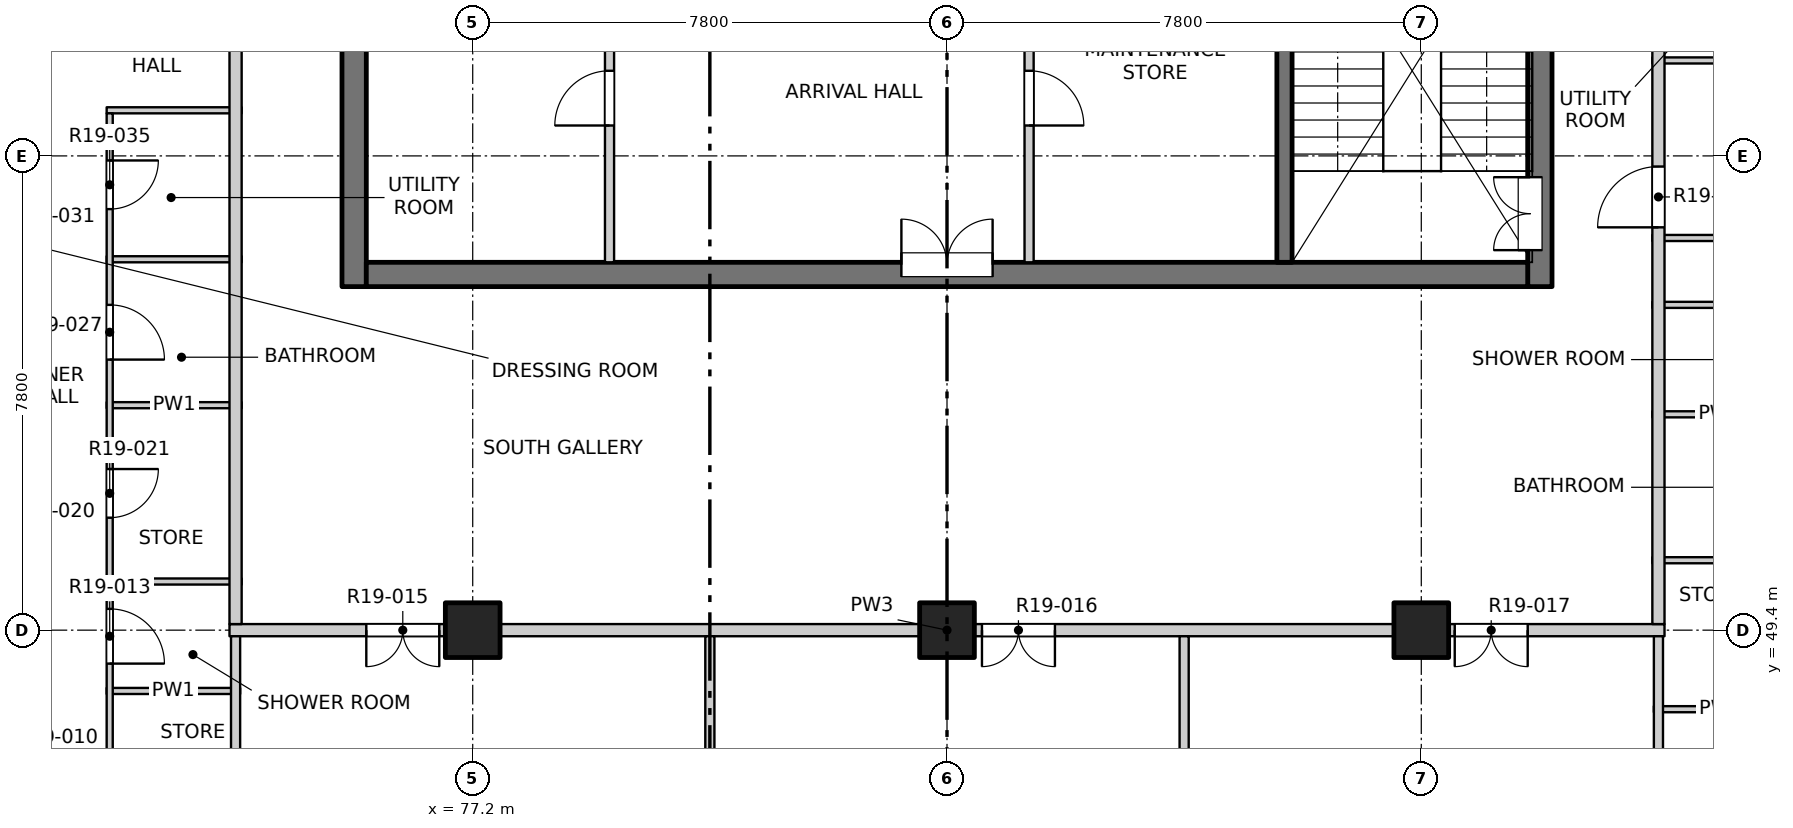
"""IFC4 building model, lengths in metres.
Left out: names, types, materials, properties, quantities, classifications, styles, units other than length and angle.
Written with IfcOpenShell. Run it as: python <this file> out.ifc"""

import sys

from ifc_helpers import new_model, si_unit, direction, frame, frame_2d, origin, origin_2d, place, context, subcontext, project, spatial, rectangle, extrude, element, fill, save


model = new_model("IFC4")
c1 = context("Model", 3, precision=1e-05, world=origin(), true_north=direction((0.0, 1.0)))
c2 = subcontext(c1, "Body", "Model", "MODEL_VIEW")
j1 = project(units=[si_unit("LENGTHUNIT", "METRE"), si_unit("PLANEANGLEUNIT", "RADIAN")], contexts=[c1])
p1 = place(None, origin())
s1 = spatial("IfcSite", under=j1, at=p1, CompositionType="ELEMENT")
p2 = place(p1, origin())
s2 = spatial("IfcBuilding", under=s1, at=p2, CompositionType="ELEMENT")
p3 = place(p2, frame((0.0, 0.0, 197.3)))
s3 = spatial("IfcBuildingStorey", under=s2, at=p3, CompositionType="ELEMENT", Elevation=197.3)
for number, where, z_axis, x_axis in (
    (1, (77.2, 49.4, -0.3), (0.0, 0.0, 1.0), (1.0, 0.0, 0.0)),
    (2, (85.0, 49.4, -0.3), (0.0, 0.0, 1.0), (1.0, 0.0, 0.0)),
    (3, (92.8, 49.4, -0.3), (0.0, 0.0, 1.0), (1.0, 0.0, 0.0)),
):
    element("IfcColumn", number, at=place(p3, frame(where, z_axis=z_axis, x_axis=x_axis)), inside=s3, PredefinedType="COLUMN", context=c2, shape_type="SweptSolid", body=[
        extrude(rectangle(XDim=0.9, YDim=0.9, at=origin_2d()), origin(), (0.0, 0.0, 1.0), 3.45),
    ])
p4 = place(p3, frame((75.25, 55.05, -0.3), z_axis=(0.0, 0.0, 1.0), x_axis=(0.0, 1.0, 0.0)))
e4 = element("IfcWall", 4, at=p4, inside=s3, PredefinedType="SOLIDWALL", context=c2, shape_type="SweptSolid", body=[
    extrude(rectangle(XDim=22.25, YDim=0.4, at=frame_2d((11.125, 0.0))), origin(), (0.0, 0.0, 1.0), 3.45),
])
p5 = place(p4, frame((7.4, 0.0, 0.3)))
e5 = element("IfcOpeningElement", 5, at=p5, cuts=e4, PredefinedType="OPENING", context=c2, shape_type="SweptSolid", body=[
    extrude(rectangle(XDim=0.9, YDim=2.1, at=frame_2d((0.45, 1.05))), frame((0.0, 0.21, 0.0), z_axis=(0.0, -1.0, 0.0), x_axis=(1.0, 0.0, 0.0)), (0.0, 0.0, 1.0), 0.42),
])
p6 = place(p4, frame((13.7, 0.0, 0.3)))
e6 = element("IfcOpeningElement", 6, at=p6, cuts=e4, PredefinedType="OPENING", context=c2, shape_type="SweptSolid", body=[
    extrude(rectangle(XDim=0.9, YDim=2.1, at=frame_2d((0.45, 1.05))), frame((0.0, 0.21, 0.0), z_axis=(0.0, -1.0, 0.0), x_axis=(1.0, 0.0, 0.0)), (0.0, 0.0, 1.0), 0.42),
])
p7 = place(p4, frame((20.0, 0.0, 0.3)))
e7 = element("IfcOpeningElement", 7, at=p7, cuts=e4, PredefinedType="OPENING", context=c2, shape_type="SweptSolid", body=[
    extrude(rectangle(XDim=0.9, YDim=2.1, at=frame_2d((0.45, 1.05))), frame((0.0, 0.21, 0.0), z_axis=(0.0, -1.0, 0.0), x_axis=(1.0, 0.0, 0.0)), (0.0, 0.0, 1.0), 0.42),
])
p8 = place(p3, frame((94.75, 55.05, -0.3), z_axis=(0.0, 0.0, 1.0), x_axis=(0.0, 1.0, 0.0)))
e8 = element("IfcWall", 8, at=p8, inside=s3, PredefinedType="SOLIDWALL", context=c2, shape_type="SweptSolid", body=[
    extrude(rectangle(XDim=6.9, YDim=0.4, at=frame_2d((3.45, 0.0))), origin(), (0.0, 0.0, 1.0), 3.45),
])
p9 = place(p8, frame((0.6, 0.0, 0.3)))
e9 = element("IfcOpeningElement", 9, at=p9, cuts=e8, PredefinedType="OPENING", context=c2, shape_type="SweptSolid", body=[
    extrude(rectangle(XDim=1.2, YDim=2.1, at=frame_2d((0.6, 1.05))), frame((0.0, 0.21, 0.0), z_axis=(0.0, -1.0, 0.0), x_axis=(1.0, 0.0, 0.0)), (0.0, 0.0, 1.0), 0.42),
])
p10 = place(p3, frame((75.45, 55.25, -0.3), z_axis=(0.0, 0.0, 1.0), x_axis=(1.0, 0.0, 0.0)))
e10 = element("IfcWall", 10, at=p10, inside=s3, PredefinedType="SOLIDWALL", context=c2, shape_type="SweptSolid", body=[
    extrude(rectangle(XDim=19.1, YDim=0.4, at=frame_2d((9.55, 0.0))), origin(), (0.0, 0.0, 1.0), 3.45),
])
p11 = place(p10, frame((8.8, 0.0, 0.3)))
e11 = element("IfcOpeningElement", 11, at=p11, cuts=e10, PredefinedType="OPENING", context=c2, shape_type="SweptSolid", body=[
    extrude(rectangle(XDim=1.5, YDim=2.1, at=frame_2d((0.75, 1.05))), frame((0.0, 0.21, 0.0), z_axis=(0.0, -1.0, 0.0), x_axis=(1.0, 0.0, 0.0)), (0.0, 0.0, 1.0), 0.42),
])
p12 = place(p3, frame((90.55, 55.45, -0.3), z_axis=(0.0, 0.0, 1.0), x_axis=(0.0, 1.0, 0.0)))
e12 = element("IfcWall", 12, at=p12, inside=s3, PredefinedType="SOLIDWALL", context=c2, shape_type="SweptSolid", body=[
    extrude(rectangle(XDim=6.5, YDim=0.25, at=frame_2d((3.25, 0.0))), origin(), (0.0, 0.0, 1.0), 3.45),
])
p13 = place(p3, frame((96.625, 48.1, 0.0), z_axis=(0.0, 0.0, 1.0), x_axis=(1.0, 0.0, 0.0)))
e13 = element("IfcWall", 13, at=p13, inside=s3, PredefinedType="PARTITIONING", context=c2, shape_type="SweptSolid", body=[
    extrude(rectangle(XDim=2.195, YDim=0.1, at=frame_2d((1.098, 0.0))), origin(), (0.0, 0.0, 1.0), 3.15),
])
p14 = place(p3, frame((71.18, 48.4, 0.0), z_axis=(0.0, 0.0, 1.0), x_axis=(1.0, 0.0, 0.0)))
e14 = element("IfcWall", 14, at=p14, inside=s3, PredefinedType="PARTITIONING", context=c2, shape_type="SweptSolid", body=[
    extrude(rectangle(XDim=2.195, YDim=0.1, at=frame_2d((1.097, 0.0))), origin(), (0.0, 0.0, 1.0), 3.15),
])
p15 = place(p3, frame((73.2, 49.4, 0.0), z_axis=(0.0, 0.0, 1.0), x_axis=(1.0, 0.0, 0.0)))
e15 = element("IfcWall", 15, at=p15, inside=s3, PredefinedType="PARTITIONING", context=c2, shape_type="SweptSolid", body=[
    extrude(rectangle(XDim=23.6, YDim=0.2, at=frame_2d((11.8, 0.0))), origin(), (0.0, 0.0, 1.0), 3.15),
])
p16 = place(p15, frame((2.25, 0.0, 0.0)))
e16 = element("IfcOpeningElement", 16, at=p16, cuts=e15, PredefinedType="OPENING", context=c2, shape_type="SweptSolid", body=[
    extrude(rectangle(XDim=1.2, YDim=2.1, at=frame_2d((0.6, 1.05))), frame((0.0, 0.11, 0.0), z_axis=(0.0, -1.0, 0.0), x_axis=(1.0, 0.0, 0.0)), (0.0, 0.0, 1.0), 0.22),
])
p17 = place(p15, frame((12.375, 0.0, 0.0)))
e17 = element("IfcOpeningElement", 17, at=p17, cuts=e15, PredefinedType="OPENING", context=c2, shape_type="SweptSolid", body=[
    extrude(rectangle(XDim=1.2, YDim=2.1, at=frame_2d((0.6, 1.05))), frame((0.0, 0.11, 0.0), z_axis=(0.0, -1.0, 0.0), x_axis=(1.0, 0.0, 0.0)), (0.0, 0.0, 1.0), 0.22),
])
p18 = place(p15, frame((20.15, 0.0, 0.0)))
e18 = element("IfcOpeningElement", 18, at=p18, cuts=e15, PredefinedType="OPENING", context=c2, shape_type="SweptSolid", body=[
    extrude(rectangle(XDim=1.2, YDim=2.1, at=frame_2d((0.6, 1.05))), frame((0.0, 0.11, 0.0), z_axis=(0.0, -1.0, 0.0), x_axis=(1.0, 0.0, 0.0)), (0.0, 0.0, 1.0), 0.22),
])
for number, where, z_axis, x_axis in (
    (19, (71.18, 50.2, 0.0), (0.0, 0.0, 1.0), (1.0, 0.0, 0.0)),
    (20, (96.6, 50.55, 0.0), (0.0, 0.0, 1.0), (1.0, 0.0, 0.0)),
    (21, (96.6, 52.95, 0.0), (0.0, 0.0, 1.0), (1.0, 0.0, 0.0)),
    (22, (71.18, 53.1, 0.0), (0.0, 0.0, 1.0), (1.0, 0.0, 0.0)),
    (23, (96.6, 54.75, 0.0), (0.0, 0.0, 1.0), (1.0, 0.0, 0.0)),
    (24, (71.18, 55.5, 0.0), (0.0, 0.0, 1.0), (1.0, 0.0, 0.0)),
    (25, (96.6, 55.85, 0.0), (0.0, 0.0, 1.0), (1.0, 0.0, 0.0)),
    (26, (71.18, 57.95, 0.0), (0.0, 0.0, 1.0), (1.0, 0.0, 0.0)),
    (27, (96.6, 58.77, 0.0), (0.0, 0.0, 1.0), (1.0, 0.0, 0.0)),
):
    element("IfcWall", number, at=place(p3, frame(where, z_axis=z_axis, x_axis=x_axis)), inside=s3, PredefinedType="PARTITIONING", context=c2, shape_type="SweptSolid", body=[
        extrude(rectangle(XDim=2.22, YDim=0.1, at=frame_2d((1.11, 0.0))), origin(), (0.0, 0.0, 1.0), 3.15),
    ])
p19 = place(p3, frame((71.23, 45.55, 0.0), z_axis=(0.0, 0.0, 1.0), x_axis=(0.0, 1.0, 0.0)))
e28 = element("IfcWall", 28, at=p19, inside=s3, PredefinedType="PARTITIONING", context=c2, shape_type="SweptSolid", body=[
    extrude(rectangle(XDim=12.35, YDim=0.1, at=frame_2d((6.175, 0.0))), origin(), (0.0, 0.0, 1.0), 3.15),
])
p20 = place(p19, frame((1.0, 0.0, 0.0)))
e29 = element("IfcOpeningElement", 29, at=p20, cuts=e28, PredefinedType="OPENING", context=c2, shape_type="SweptSolid", body=[
    extrude(rectangle(XDim=0.8, YDim=2.1, at=frame_2d((0.4, 1.05))), frame((0.0, 0.06, 0.0), z_axis=(0.0, -1.0, 0.0), x_axis=(1.0, 0.0, 0.0)), (0.0, 0.0, 1.0), 0.12),
])
p21 = place(p19, frame((3.3, 0.0, 0.0)))
e30 = element("IfcOpeningElement", 30, at=p21, cuts=e28, PredefinedType="OPENING", context=c2, shape_type="SweptSolid", body=[
    extrude(rectangle(XDim=0.9, YDim=2.1, at=frame_2d((0.45, 1.05))), frame((0.0, 0.06, 0.0), z_axis=(0.0, -1.0, 0.0), x_axis=(1.0, 0.0, 0.0)), (0.0, 0.0, 1.0), 0.12),
])
p22 = place(p19, frame((5.7, 0.0, 0.0)))
e31 = element("IfcOpeningElement", 31, at=p22, cuts=e28, PredefinedType="OPENING", context=c2, shape_type="SweptSolid", body=[
    extrude(rectangle(XDim=0.8, YDim=2.1, at=frame_2d((0.4, 1.05))), frame((0.0, 0.06, 0.0), z_axis=(0.0, -1.0, 0.0), x_axis=(1.0, 0.0, 0.0)), (0.0, 0.0, 1.0), 0.12),
])
p23 = place(p19, frame((8.3, 0.0, 0.0)))
e32 = element("IfcOpeningElement", 32, at=p23, cuts=e28, PredefinedType="OPENING", context=c2, shape_type="SweptSolid", body=[
    extrude(rectangle(XDim=0.9, YDim=2.1, at=frame_2d((0.45, 1.05))), frame((0.0, 0.06, 0.0), z_axis=(0.0, -1.0, 0.0), x_axis=(1.0, 0.0, 0.0)), (0.0, 0.0, 1.0), 0.12),
])
p24 = place(p19, frame((10.775, 0.0, 0.0)))
e33 = element("IfcOpeningElement", 33, at=p24, cuts=e28, PredefinedType="OPENING", context=c2, shape_type="SweptSolid", body=[
    extrude(rectangle(XDim=0.8, YDim=2.1, at=frame_2d((0.4, 1.05))), frame((0.0, 0.06, 0.0), z_axis=(0.0, -1.0, 0.0), x_axis=(1.0, 0.0, 0.0)), (0.0, 0.0, 1.0), 0.12),
])
p25 = place(p3, frame((73.3, 41.9, 0.0), z_axis=(0.0, 0.0, 1.0), x_axis=(0.0, 1.0, 0.0)))
e34 = element("IfcWall", 34, at=p25, inside=s3, PredefinedType="PARTITIONING", context=c2, shape_type="SweptSolid", body=[
    extrude(rectangle(XDim=7.4, YDim=0.15, at=frame_2d((3.7, 0.0))), origin(), (0.0, 0.0, 1.0), 3.15),
])
p26 = place(p3, frame((73.3, 49.5, 0.0), z_axis=(0.0, 0.0, 1.0), x_axis=(0.0, 1.0, 0.0)))
e35 = element("IfcWall", 35, at=p26, inside=s3, PredefinedType="PARTITIONING", context=c2, shape_type="SweptSolid", body=[
    extrude(rectangle(XDim=34.9, YDim=0.2, at=frame_2d((17.45, 0.0))), origin(), (0.0, 0.0, 1.0), 3.15),
])
p27 = place(p26, frame((9.725, 0.0, 0.0)))
e36 = element("IfcOpeningElement", 36, at=p27, cuts=e35, PredefinedType="OPENING", context=c2, shape_type="SweptSolid", body=[
    extrude(rectangle(XDim=1.0, YDim=2.1, at=frame_2d((0.5, 1.05))), frame((0.0, 0.11, 0.0), z_axis=(0.0, -1.0, 0.0), x_axis=(1.0, 0.0, 0.0)), (0.0, 0.0, 1.0), 0.22),
])
p28 = place(p26, frame((17.925, 0.0, 0.0)))
e37 = element("IfcOpeningElement", 37, at=p28, cuts=e35, PredefinedType="OPENING", context=c2, shape_type="SweptSolid", body=[
    extrude(rectangle(XDim=1.0, YDim=2.1, at=frame_2d((0.5, 1.05))), frame((0.0, 0.11, 0.0), z_axis=(0.0, -1.0, 0.0), x_axis=(1.0, 0.0, 0.0)), (0.0, 0.0, 1.0), 0.22),
])
p29 = place(p26, frame((33.675, 0.0, 0.0)))
e38 = element("IfcOpeningElement", 38, at=p29, cuts=e35, PredefinedType="OPENING", context=c2, shape_type="SweptSolid", body=[
    extrude(rectangle(XDim=1.0, YDim=2.1, at=frame_2d((0.5, 1.05))), frame((0.0, 0.11, 0.0), z_axis=(0.0, -1.0, 0.0), x_axis=(1.0, 0.0, 0.0)), (0.0, 0.0, 1.0), 0.22),
])
p30 = place(p3, frame((79.45, 55.45, 0.0), z_axis=(0.0, 0.0, 1.0), x_axis=(0.0, 1.0, 0.0)))
e39 = element("IfcWall", 39, at=p30, inside=s3, PredefinedType="PARTITIONING", context=c2, shape_type="SweptSolid", body=[
    extrude(rectangle(XDim=5.45, YDim=0.15, at=frame_2d((2.725, 0.0))), origin(), (0.0, 0.0, 1.0), 3.15),
])
p31 = place(p30, frame((2.25, 0.0, 0.0)))
e40 = element("IfcOpeningElement", 40, at=p31, cuts=e39, PredefinedType="OPENING", context=c2, shape_type="SweptSolid", body=[
    extrude(rectangle(XDim=0.9, YDim=2.1, at=frame_2d((0.45, 1.05))), frame((0.0, 0.085, 0.0), z_axis=(0.0, -1.0, 0.0), x_axis=(1.0, 0.0, 0.0)), (0.0, 0.0, 1.0), 0.17),
])
p32 = place(p3, frame((81.1, 41.9, 0.0), z_axis=(0.0, 0.0, 1.0), x_axis=(0.0, 1.0, 0.0)))
e41 = element("IfcWall", 41, at=p32, inside=s3, PredefinedType="PARTITIONING", context=c2, shape_type="SweptSolid", body=[
    extrude(rectangle(XDim=7.4, YDim=0.15, at=frame_2d((3.7, 0.0))), origin(), (0.0, 0.0, 1.0), 2.55),
])
p33 = place(p3, frame((86.35, 55.45, 0.0), z_axis=(0.0, 0.0, 1.0), x_axis=(0.0, 1.0, 0.0)))
e42 = element("IfcWall", 42, at=p33, inside=s3, PredefinedType="PARTITIONING", context=c2, shape_type="SweptSolid", body=[
    extrude(rectangle(XDim=5.575, YDim=0.15, at=frame_2d((2.788, 0.0))), origin(), (0.0, 0.0, 1.0), 3.15),
])
p34 = place(p33, frame((2.25, 0.0, 0.0)))
e43 = element("IfcOpeningElement", 43, at=p34, cuts=e42, PredefinedType="OPENING", context=c2, shape_type="SweptSolid", body=[
    extrude(rectangle(XDim=0.9, YDim=2.1, at=frame_2d((0.45, 1.05))), frame((0.0, 0.085, 0.0), z_axis=(0.0, -1.0, 0.0), x_axis=(1.0, 0.0, 0.0)), (0.0, 0.0, 1.0), 0.17),
])
p35 = place(p3, frame((88.9, 41.9, 0.0), z_axis=(0.0, 0.0, 1.0), x_axis=(0.0, 1.0, 0.0)))
e44 = element("IfcWall", 44, at=p35, inside=s3, PredefinedType="PARTITIONING", context=c2, shape_type="SweptSolid", body=[
    extrude(rectangle(XDim=7.4, YDim=0.15, at=frame_2d((3.7, 0.0))), origin(), (0.0, 0.0, 1.0), 2.55),
])
p36 = place(p3, frame((96.7, 41.9, 0.0), z_axis=(0.0, 0.0, 1.0), x_axis=(0.0, 1.0, 0.0)))
e45 = element("IfcWall", 45, at=p36, inside=s3, PredefinedType="PARTITIONING", context=c2, shape_type="SweptSolid", body=[
    extrude(rectangle(XDim=7.4, YDim=0.15, at=frame_2d((3.7, 0.0))), origin(), (0.0, 0.0, 1.0), 3.15),
])
p37 = place(p3, frame((96.7, 49.5, 0.0), z_axis=(0.0, 0.0, 1.0), x_axis=(0.0, 1.0, 0.0)))
e46 = element("IfcWall", 46, at=p37, inside=s3, PredefinedType="PARTITIONING", context=c2, shape_type="SweptSolid", body=[
    extrude(rectangle(XDim=34.9, YDim=0.2, at=frame_2d((17.45, 0.0))), origin(), (0.0, 0.0, 1.0), 3.15),
])
p38 = place(p37, frame((6.525, 0.0, 0.0)))
e47 = element("IfcOpeningElement", 47, at=p38, cuts=e46, PredefinedType="OPENING", context=c2, shape_type="SweptSolid", body=[
    extrude(rectangle(XDim=1.0, YDim=2.1, at=frame_2d((0.5, 1.05))), frame((0.0, 0.11, 0.0), z_axis=(0.0, -1.0, 0.0), x_axis=(1.0, 0.0, 0.0)), (0.0, 0.0, 1.0), 0.22),
])
p39 = place(p37, frame((14.275, 0.0, 0.0)))
e48 = element("IfcOpeningElement", 48, at=p39, cuts=e46, PredefinedType="OPENING", context=c2, shape_type="SweptSolid", body=[
    extrude(rectangle(XDim=1.0, YDim=2.1, at=frame_2d((0.5, 1.05))), frame((0.0, 0.11, 0.0), z_axis=(0.0, -1.0, 0.0), x_axis=(1.0, 0.0, 0.0)), (0.0, 0.0, 1.0), 0.22),
])
p40 = place(p37, frame((25.075, 0.0, 0.0)))
e49 = element("IfcOpeningElement", 49, at=p40, cuts=e46, PredefinedType="OPENING", context=c2, shape_type="SweptSolid", body=[
    extrude(rectangle(XDim=1.0, YDim=2.1, at=frame_2d((0.5, 1.05))), frame((0.0, 0.11, 0.0), z_axis=(0.0, -1.0, 0.0), x_axis=(1.0, 0.0, 0.0)), (0.0, 0.0, 1.0), 0.22),
])
p41 = place(p37, frame((30.475, 0.0, 0.0)))
e50 = element("IfcOpeningElement", 50, at=p41, cuts=e46, PredefinedType="OPENING", context=c2, shape_type="SweptSolid", body=[
    extrude(rectangle(XDim=1.0, YDim=2.1, at=frame_2d((0.5, 1.05))), frame((0.0, 0.11, 0.0), z_axis=(0.0, -1.0, 0.0), x_axis=(1.0, 0.0, 0.0)), (0.0, 0.0, 1.0), 0.22),
])
p42 = place(p21, origin())
e51 = element("IfcDoor", 51, at=p42, inside=s3, OperationType="SINGLE_SWING_RIGHT", PredefinedType="DOOR", context=c2, shape_type="SweptSolid", body=[
    extrude(rectangle(XDim=0.9, YDim=2.1, at=frame_2d((0.45, 1.05))), frame((0.0, 0.025, 0.0), z_axis=(0.0, -1.0, 0.0), x_axis=(1.0, 0.0, 0.0)), (0.0, 0.0, 1.0), 0.05),
])
fill(e30, e51)
p43 = place(p16, origin())
e52 = element("IfcDoor", 52, at=p43, inside=s3, OperationType="DOUBLE_DOOR_SINGLE_SWING", PredefinedType="DOOR", context=c2, shape_type="SweptSolid", body=[
    extrude(rectangle(XDim=1.2, YDim=2.1, at=frame_2d((0.6, 1.05))), frame((0.0, 0.025, 0.0), z_axis=(0.0, -1.0, 0.0), x_axis=(1.0, 0.0, 0.0)), (0.0, 0.0, 1.0), 0.05),
])
fill(e16, e52)
p44 = place(p17, origin())
e53 = element("IfcDoor", 53, at=p44, inside=s3, OperationType="DOUBLE_DOOR_SINGLE_SWING", PredefinedType="DOOR", context=c2, shape_type="SweptSolid", body=[
    extrude(rectangle(XDim=1.2, YDim=2.1, at=frame_2d((0.6, 1.05))), frame((0.0, 0.025, 0.0), z_axis=(0.0, -1.0, 0.0), x_axis=(1.0, 0.0, 0.0)), (0.0, 0.0, 1.0), 0.05),
])
fill(e17, e53)
p45 = place(p18, origin())
e54 = element("IfcDoor", 54, at=p45, inside=s3, OperationType="DOUBLE_DOOR_SINGLE_SWING", PredefinedType="DOOR", context=c2, shape_type="SweptSolid", body=[
    extrude(rectangle(XDim=1.2, YDim=2.1, at=frame_2d((0.6, 1.05))), frame((0.0, 0.025, 0.0), z_axis=(0.0, -1.0, 0.0), x_axis=(1.0, 0.0, 0.0)), (0.0, 0.0, 1.0), 0.05),
])
fill(e18, e54)
p46 = place(p22, origin())
e55 = element("IfcDoor", 55, at=p46, inside=s3, OperationType="SINGLE_SWING_LEFT", PredefinedType="DOOR", context=c2, shape_type="SweptSolid", body=[
    extrude(rectangle(XDim=0.8, YDim=2.1, at=frame_2d((0.4, 1.05))), frame((0.0, 0.025, 0.0), z_axis=(0.0, -1.0, 0.0), x_axis=(1.0, 0.0, 0.0)), (0.0, 0.0, 1.0), 0.05),
])
fill(e31, e55)
p47 = place(p23, origin())
e56 = element("IfcDoor", 56, at=p47, inside=s3, OperationType="SINGLE_SWING_RIGHT", PredefinedType="DOOR", context=c2, shape_type="SweptSolid", body=[
    extrude(rectangle(XDim=0.9, YDim=2.1, at=frame_2d((0.45, 1.05))), frame((0.0, 0.025, 0.0), z_axis=(0.0, -1.0, 0.0), x_axis=(1.0, 0.0, 0.0)), (0.0, 0.0, 1.0), 0.05),
])
fill(e32, e56)
p48 = place(p11, origin())
e57 = element("IfcDoor", 57, at=p48, inside=s3, OperationType="DOUBLE_DOOR_SINGLE_SWING", PredefinedType="DOOR", context=c2, shape_type="SweptSolid", body=[
    extrude(rectangle(XDim=1.5, YDim=2.1, at=frame_2d((0.75, 1.05))), frame((0.0, 0.185, 0.0), z_axis=(0.0, -1.0, 0.0), x_axis=(1.0, 0.0, 0.0)), (0.0, 0.0, 1.0), 0.05),
])
fill(e11, e57)
p49 = place(p9, origin())
e58 = element("IfcDoor", 58, at=p49, inside=s3, OperationType="DOUBLE_DOOR_SINGLE_SWING", PredefinedType="DOOR", context=c2, shape_type="SweptSolid", body=[
    extrude(rectangle(XDim=1.2, YDim=2.1, at=frame_2d((0.6, 1.05))), frame((0.0, 0.185, 0.0), z_axis=(0.0, -1.0, 0.0), x_axis=(1.0, 0.0, 0.0)), (0.0, 0.0, 1.0), 0.05),
])
fill(e9, e58)
p50 = place(p38, origin())
e59 = element("IfcDoor", 59, at=p50, inside=s3, OperationType="SINGLE_SWING_LEFT", PredefinedType="DOOR", context=c2, shape_type="SweptSolid", body=[
    extrude(rectangle(XDim=1.0, YDim=2.1, at=frame_2d((0.5, 1.05))), frame((0.0, 0.025, 0.0), z_axis=(0.0, -1.0, 0.0), x_axis=(1.0, 0.0, 0.0)), (0.0, 0.0, 1.0), 0.05),
])
fill(e47, e59)
p51 = place(p24, origin())
e60 = element("IfcDoor", 60, at=p51, inside=s3, OperationType="SINGLE_SWING_LEFT", PredefinedType="DOOR", context=c2, shape_type="SweptSolid", body=[
    extrude(rectangle(XDim=0.8, YDim=2.1, at=frame_2d((0.4, 1.05))), frame((0.0, 0.025, 0.0), z_axis=(0.0, -1.0, 0.0), x_axis=(1.0, 0.0, 0.0)), (0.0, 0.0, 1.0), 0.05),
])
fill(e33, e60)
p52 = place(p31, origin())
e61 = element("IfcDoor", 61, at=p52, inside=s3, OperationType="SINGLE_SWING_LEFT", PredefinedType="DOOR", context=c2, shape_type="SweptSolid", body=[
    extrude(rectangle(XDim=0.9, YDim=2.1, at=frame_2d((0.45, 1.05))), frame((0.0, 0.025, 0.0), z_axis=(0.0, -1.0, 0.0), x_axis=(1.0, 0.0, 0.0)), (0.0, 0.0, 1.0), 0.05),
])
fill(e40, e61)
p53 = place(p34, origin())
e62 = element("IfcDoor", 62, at=p53, inside=s3, OperationType="SINGLE_SWING_RIGHT", PredefinedType="DOOR", context=c2, shape_type="SweptSolid", body=[
    extrude(rectangle(XDim=0.9, YDim=2.1, at=frame_2d((0.45, 1.05))), frame((0.0, 0.025, 0.0), z_axis=(0.0, -1.0, 0.0), x_axis=(1.0, 0.0, 0.0)), (0.0, 0.0, 1.0), 0.05),
])
fill(e43, e62)
save(model, sys.argv[1])
